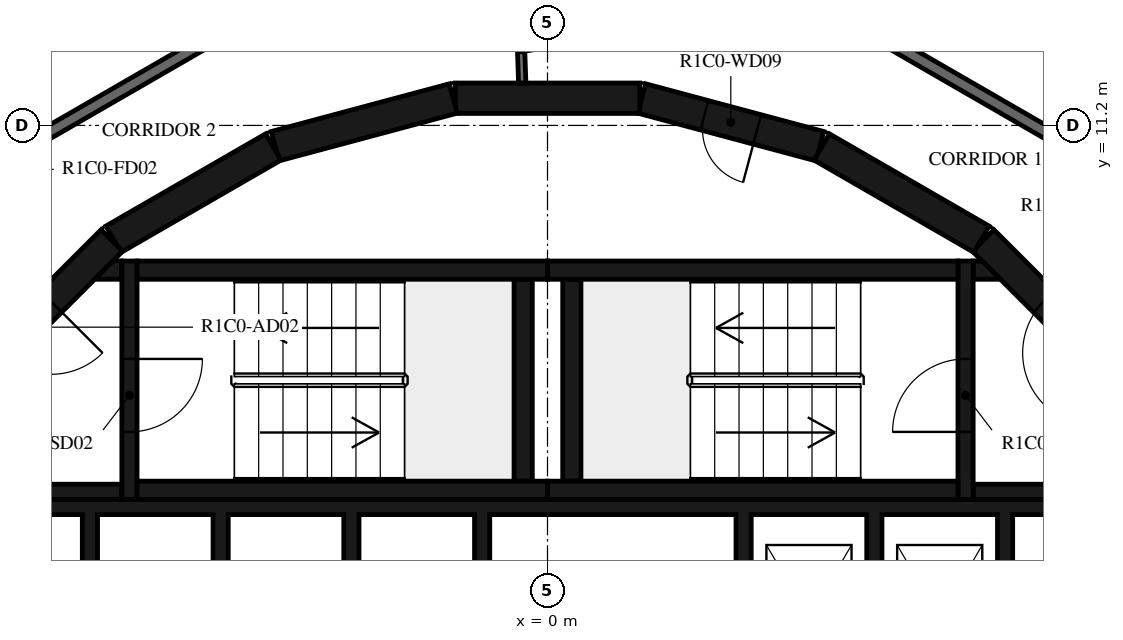
"""IFC4 building model, lengths in metres.
Left out: names, types, materials, properties, quantities, classifications, styles, units other than length and angle.
Written with IfcOpenShell. Run it as: python <this file> out.ifc"""

import sys

from ifc_helpers import new_model, si_unit, direction, frame, frame_2d, origin, place, context, subcontext, project, spatial, polyline, rectangle, outline, extrude, element, fill, save


model = new_model("IFC4")
c1 = context("Model", 3, precision=1e-05, world=origin(), true_north=direction((0.0, 1.0)))
c2 = subcontext(c1, "Body", "Model", "MODEL_VIEW")
j1 = project(units=[si_unit("LENGTHUNIT", "METRE"), si_unit("PLANEANGLEUNIT", "RADIAN")], contexts=[c1])
p1 = place(None, origin())
s1 = spatial("IfcSite", under=j1, at=p1, CompositionType="ELEMENT")
p2 = place(p1, origin())
s2 = spatial("IfcBuilding", under=s1, at=p2, CompositionType="ELEMENT")
p3 = place(p2, frame((0.0, 0.0, 59.4)))
s3 = spatial("IfcBuildingStorey", under=s2, at=p3, CompositionType="ELEMENT", Elevation=59.4)
p4 = place(p3, frame((9.308, 7.164, 0.0), z_axis=(0.0, 0.0, 1.0), x_axis=(-0.707106781187, 0.707106781187, 0.0)))
e1 = element("IfcWall", 1, at=p4, inside=s3, PredefinedType="SHEAR", context=c2, shape_type="SweptSolid", body=[
    extrude(rectangle(XDim=3.032, YDim=0.5, at=frame_2d((1.516, 0.0))), origin(), (0.0, 0.0, 1.0), 3.12),
])
p5 = place(p4, frame((0.416, 0.0, 0.0)))
e2 = element("IfcOpeningElement", 2, at=p5, cuts=e1, PredefinedType="OPENING", context=c2, shape_type="SweptSolid", body=[
    extrude(rectangle(XDim=1.2, YDim=2.1, at=frame_2d((0.6, 1.05))), frame((0.0, 0.26, 0.0), z_axis=(0.0, -1.0, 0.0), x_axis=(1.0, 0.0, 0.0)), (0.0, 0.0, 1.0), 0.52),
])
p6 = place(p3, frame((7.137, 9.329, 0.0), z_axis=(0.0, 0.0, 1.0), x_axis=(-0.865975092491, 0.500087131594, 0.0)))
e3 = element("IfcWall", 3, at=p6, inside=s3, PredefinedType="SHEAR", context=c2, shape_type="SweptSolid", body=[
    extrude(rectangle(XDim=3.033, YDim=0.5, at=frame_2d((1.516, 0.0))), origin(), (0.0, 0.0, 1.0), 3.12),
])
p7 = place(p3, frame((4.479, 10.858, 0.0), z_axis=(0.0, 0.0, 1.0), x_axis=(-0.965948410781, 0.258734743916, 0.0)))
e4 = element("IfcWall", 4, at=p7, inside=s3, PredefinedType="SHEAR", context=c2, shape_type="SweptSolid", body=[
    extrude(rectangle(XDim=3.033, YDim=0.5, at=frame_2d((1.516, 0.0))), origin(), (0.0, 0.0, 1.0), 3.12),
])
p8 = place(p7, frame((1.066, 0.0, 0.0)))
e5 = element("IfcOpeningElement", 5, at=p8, cuts=e4, PredefinedType="OPENING", context=c2, shape_type="SweptSolid", body=[
    extrude(rectangle(XDim=0.9, YDim=2.1, at=frame_2d((0.45, 1.05))), frame((0.0, 0.26, 0.0), z_axis=(0.0, -1.0, 0.0), x_axis=(1.0, 0.0, 0.0)), (0.0, 0.0, 1.0), 0.52),
])
for number, where, z_axis, x_axis in (
    (6, (1.516, 11.647, 0.0), (0.0, 0.0, 1.0), (-1.0, 0.0, 0.0)),
    (7, (-1.55, 11.643, 0.0), (0.0, 0.0, 1.0), (-0.966, -0.259, 0.0)),
    (8, (-4.51, 10.845, 0.0), (0.0, 0.0, 1.0), (-0.866, -0.5, 0.0)),
):
    element("IfcWall", number, at=place(p3, frame(where, z_axis=z_axis, x_axis=x_axis)), inside=s3, PredefinedType="SHEAR", context=c2, shape_type="SweptSolid", body=[
        extrude(rectangle(XDim=3.033, YDim=0.5, at=frame_2d((1.516, 0.0))), origin(), (0.0, 0.0, 1.0), 3.12),
    ])
p9 = place(p3, frame((-7.164, 9.308, 0.0), z_axis=(0.0, 0.0, 1.0), x_axis=(-0.707106781187, -0.707106781187, 0.0)))
e9 = element("IfcWall", 9, at=p9, inside=s3, PredefinedType="SHEAR", context=c2, shape_type="SweptSolid", body=[
    extrude(rectangle(XDim=3.032, YDim=0.5, at=frame_2d((1.516, 0.0))), origin(), (0.0, 0.0, 1.0), 3.12),
])
p10 = place(p9, frame((1.416, 0.0, 0.0)))
e10 = element("IfcOpeningElement", 10, at=p10, cuts=e9, PredefinedType="OPENING", context=c2, shape_type="SweptSolid", body=[
    extrude(rectangle(XDim=1.2, YDim=2.1, at=frame_2d((0.6, 1.05))), frame((0.0, 0.26, 0.0), z_axis=(0.0, -1.0, 0.0), x_axis=(1.0, 0.0, 0.0)), (0.0, 0.0, 1.0), 0.52),
])
for number, where, z_axis, x_axis in (
    (11, (0.0, 5.2, 0.0), (0.0, 0.0, 1.0), (1.0, 0.0, 0.0)),
    (12, (0.0, 8.82, 0.0), (0.0, 0.0, 1.0), (1.0, 0.0, 0.0)),
):
    element("IfcWall", number, at=place(p3, frame(where, z_axis=z_axis, x_axis=x_axis)), inside=s3, PredefinedType="SHEAR", context=c2, shape_type="SweptSolid", body=[
        extrude(rectangle(XDim=6.75, YDim=0.3, at=frame_2d((3.375, 0.0))), origin(), (0.0, 0.0, 1.0), 3.12),
    ])
p11 = place(p3, frame((0.4, 5.35, 0.0), z_axis=(0.0, 0.0, 1.0), x_axis=(0.0, 1.0, 0.0)))
e13 = element("IfcWall", 13, at=p11, inside=s3, PredefinedType="SHEAR", context=c2, shape_type="SweptSolid", body=[
    extrude(rectangle(XDim=3.32, YDim=0.3, at=frame_2d((1.66, 0.0))), origin(), (0.0, 0.0, 1.0), 3.12),
])
p12 = place(p3, frame((6.875, 5.05, 0.0), z_axis=(0.0, 0.0, 1.0), x_axis=(0.0, 1.0, 0.0)))
e14 = element("IfcWall", 14, at=p12, inside=s3, PredefinedType="SHEAR", context=c2, shape_type="SweptSolid", body=[
    extrude(rectangle(XDim=3.92, YDim=0.25, at=frame_2d((1.96, 0.0))), origin(), (0.0, 0.0, 1.0), 3.12),
])
p13 = place(p12, frame((1.11, 0.0, 0.0)))
e15 = element("IfcOpeningElement", 15, at=p13, cuts=e14, PredefinedType="OPENING", context=c2, shape_type="SweptSolid", body=[
    extrude(rectangle(XDim=1.2, YDim=2.1, at=frame_2d((0.6, 1.05))), frame((0.0, 0.135, 0.0), z_axis=(0.0, -1.0, 0.0), x_axis=(1.0, 0.0, 0.0)), (0.0, 0.0, 1.0), 0.27),
])
p14 = place(p3, frame((7.0, 5.175, 0.0), z_axis=(0.0, 0.0, 1.0), x_axis=(1.0, 0.0, 0.0)))
e16 = element("IfcWall", 16, at=p14, inside=s3, PredefinedType="SHEAR", context=c2, shape_type="SweptSolid", body=[
    extrude(rectangle(XDim=3.1, YDim=0.25, at=frame_2d((1.55, 0.0))), origin(), (0.0, 0.0, 1.0), 3.12),
])
p15 = place(p3, origin())
e17 = element("IfcWall", 17, at=p15, inside=s3, PredefinedType="SHEAR", context=c2, shape_type="SweptSolid", body=[
    extrude(outline(polyline([(7.448, 8.67), (7.0, 8.67), (7.0, 8.97), (7.148, 8.97), (7.448, 8.67)])), origin(), (0.0, 0.0, 1.0), 3.12),
])
for number, where, z_axis, x_axis in (
    (18, (-6.75, 5.2, 0.0), (0.0, 0.0, 1.0), (1.0, 0.0, 0.0)),
    (19, (-6.75, 8.82, 0.0), (0.0, 0.0, 1.0), (1.0, 0.0, 0.0)),
):
    element("IfcWall", number, at=place(p3, frame(where, z_axis=z_axis, x_axis=x_axis)), inside=s3, PredefinedType="SHEAR", context=c2, shape_type="SweptSolid", body=[
        extrude(rectangle(XDim=6.75, YDim=0.3, at=frame_2d((3.375, 0.0))), origin(), (0.0, 0.0, 1.0), 3.12),
    ])
p16 = place(p3, frame((-0.4, 5.35, 0.0), z_axis=(0.0, 0.0, 1.0), x_axis=(0.0, 1.0, 0.0)))
e20 = element("IfcWall", 20, at=p16, inside=s3, PredefinedType="SHEAR", context=c2, shape_type="SweptSolid", body=[
    extrude(rectangle(XDim=3.32, YDim=0.3, at=frame_2d((1.66, 0.0))), origin(), (0.0, 0.0, 1.0), 3.12),
])
p17 = place(p3, frame((-6.875, 8.97, 0.0), z_axis=(0.0, 0.0, 1.0), x_axis=(0.0, -1.0, 0.0)))
e21 = element("IfcWall", 21, at=p17, inside=s3, PredefinedType="SHEAR", context=c2, shape_type="SweptSolid", body=[
    extrude(rectangle(XDim=3.92, YDim=0.25, at=frame_2d((1.96, 0.0))), origin(), (0.0, 0.0, 1.0), 3.12),
])
p18 = place(p17, frame((1.61, 0.0, 0.0)))
e22 = element("IfcOpeningElement", 22, at=p18, cuts=e21, PredefinedType="OPENING", context=c2, shape_type="SweptSolid", body=[
    extrude(rectangle(XDim=1.2, YDim=2.1, at=frame_2d((0.6, 1.05))), frame((0.0, 0.135, 0.0), z_axis=(0.0, -1.0, 0.0), x_axis=(1.0, 0.0, 0.0)), (0.0, 0.0, 1.0), 0.27),
])
p19 = place(p3, frame((-7.0, 5.175, 0.0), z_axis=(0.0, 0.0, 1.0), x_axis=(-1.0, 0.0, 0.0)))
e23 = element("IfcWall", 23, at=p19, inside=s3, PredefinedType="SHEAR", context=c2, shape_type="SweptSolid", body=[
    extrude(rectangle(XDim=3.1, YDim=0.25, at=frame_2d((1.55, 0.0))), origin(), (0.0, 0.0, 1.0), 3.12),
])
p20 = place(p3, origin())
e24 = element("IfcWall", 24, at=p20, inside=s3, PredefinedType="SHEAR", context=c2, shape_type="SweptSolid", body=[
    extrude(outline(polyline([(-7.148, 8.97), (-7.0, 8.97), (-7.0, 8.67), (-7.448, 8.67), (-7.148, 8.97)])), origin(), (0.0, 0.0, 1.0), 3.12),
])
p21 = place(p3, origin())
e25 = element("IfcWall", 25, at=p21, inside=s3, PredefinedType="SHEAR", context=c2, shape_type="SweptSolid", body=[
    extrude(outline(polyline([(-9.55, 4.8), (-7.65, 4.8), (-7.65, 1.9), (-7.4, 1.9), (-7.4, 4.8), (-5.5, 4.8), (-5.5, 1.9), (-5.25, 1.9), (-5.25, 4.8), (-3.35, 4.8), (-3.35, 1.9), (-3.1, 1.9), (-3.1, 4.8), (-1.2, 4.8), (-1.2, 1.9), (-0.95, 1.9), (-0.95, 4.8), (3.1, 4.8), (3.1, 1.9), (3.35, 1.9), (3.35, 4.8), (5.25, 4.8), (5.25, 1.9), (5.5, 1.9), (5.5, 4.8), (7.4, 4.8), (7.4, 1.9), (7.65, 1.9), (7.65, 4.8), (9.55, 4.8), (9.55, 1.9), (9.8, 1.9), (9.8, 4.8), (9.8, 5.05), (-9.8, 5.05), (-9.8, 4.8), (-9.8, 1.9), (-9.55, 1.9), (-9.55, 4.8)])), origin(), (0.0, 0.0, 1.0), 3.12),
])
p22 = place(p3, frame((-0.479, 13.7, 0.0), z_axis=(0.0, 0.0, 1.0), x_axis=(0.034919103017, -0.999390142159, 0.0)))
e26 = element("IfcWall", 26, at=p22, inside=s3, PredefinedType="PARTITIONING", context=c2, shape_type="SweptSolid", body=[
    extrude(rectangle(XDim=1.804, YDim=0.12, at=frame_2d((0.902, 0.0))), origin(), (0.0, 0.0, 1.0), 3.12),
])
p23 = place(p22, frame((0.11, 0.0, 0.0)))
e27 = element("IfcOpeningElement", 27, at=p23, cuts=e26, PredefinedType="OPENING", context=c2, shape_type="SweptSolid", body=[
    extrude(rectangle(XDim=1.2, YDim=2.1, at=frame_2d((0.6, 1.05))), frame((0.0, 0.07, 0.0), z_axis=(0.0, -1.0, 0.0), x_axis=(1.0, 0.0, 0.0)), (0.0, 0.0, 1.0), 0.14),
])
p24 = place(p3, frame((10.029, 10.029, 0.0), z_axis=(0.0, 0.0, 1.0), x_axis=(-0.866024439905, 0.500001669485, 0.0)))
e28 = element("IfcWall", 28, at=p24, inside=s3, PredefinedType="STANDARD", context=c2, shape_type="SweptSolid", body=[
    extrude(rectangle(XDim=7.342, YDim=0.2, at=frame_2d((3.671, 0.0))), origin(), (0.0, 0.0, 1.0), 3.12),
])
p25 = place(p3, frame((-3.671, 13.7, 0.0), z_axis=(0.0, 0.0, 1.0), x_axis=(-0.866031419417, -0.499989580474, 0.0)))
e29 = element("IfcWall", 29, at=p25, inside=s3, PredefinedType="STANDARD", context=c2, shape_type="SweptSolid", body=[
    extrude(rectangle(XDim=7.147, YDim=0.2, at=frame_2d((3.573, 0.0))), origin(), (0.0, 0.0, 1.0), 3.12),
])
p26 = place(p25, frame((5.947, 0.0, 0.0)))
e30 = element("IfcOpeningElement", 30, at=p26, cuts=e29, PredefinedType="OPENING", context=c2, shape_type="SweptSolid", body=[
    extrude(rectangle(XDim=1.0, YDim=2.1, at=frame_2d((0.5, 1.05))), frame((0.0, 0.11, 0.0), z_axis=(0.0, -1.0, 0.0), x_axis=(1.0, 0.0, 0.0)), (0.0, 0.0, 1.0), 0.22),
])
p27 = place(p3, frame((11.127, 11.127, 0.0), z_axis=(0.0, 0.0, 1.0), x_axis=(-0.86602299963, 0.500004164094, 0.0)))
e31 = element("IfcWall", 31, at=p27, inside=s3, PredefinedType="PARTITIONING", context=c2, shape_type="SweptSolid", body=[
    extrude(rectangle(XDim=7.052, YDim=0.12, at=frame_2d((3.526, 0.0))), origin(), (0.0, 0.0, 1.0), 3.12),
])
p28 = place(p27, frame((1.4, 0.0, 0.0)))
e32 = element("IfcOpeningElement", 32, at=p28, cuts=e31, PredefinedType="OPENING", context=c2, shape_type="SweptSolid", body=[
    extrude(rectangle(XDim=0.8, YDim=2.1, at=frame_2d((0.4, 1.05))), frame((0.0, 0.07, 0.0), z_axis=(0.0, -1.0, 0.0), x_axis=(1.0, 0.0, 0.0)), (0.0, 0.0, 1.0), 0.14),
])
p29 = place(p13, origin())
e33 = element("IfcDoor", 33, at=p29, inside=s3, OperationType="SINGLE_SWING_LEFT", PredefinedType="DOOR", context=c2, shape_type="SweptSolid", body=[
    extrude(rectangle(XDim=1.2, YDim=2.1, at=frame_2d((0.6, 1.05))), frame((0.0, 0.025, 0.0), z_axis=(0.0, -1.0, 0.0), x_axis=(1.0, 0.0, 0.0)), (0.0, 0.0, 1.0), 0.05),
])
fill(e15, e33)
p30 = place(p5, origin())
e34 = element("IfcDoor", 34, at=p30, inside=s3, OperationType="SINGLE_SWING_RIGHT", PredefinedType="DOOR", context=c2, shape_type="SweptSolid", body=[
    extrude(rectangle(XDim=1.2, YDim=2.1, at=frame_2d((0.6, 1.05))), frame((0.0, 0.025, 0.0), z_axis=(0.0, -1.0, 0.0), x_axis=(1.0, 0.0, 0.0)), (0.0, 0.0, 1.0), 0.05),
])
fill(e2, e34)
p31 = place(p18, origin())
e35 = element("IfcDoor", 35, at=p31, inside=s3, OperationType="SINGLE_SWING_LEFT", PredefinedType="DOOR", context=c2, shape_type="SweptSolid", body=[
    extrude(rectangle(XDim=1.2, YDim=2.1, at=frame_2d((0.6, 1.05))), frame((0.0, 0.025, 0.0), z_axis=(0.0, -1.0, 0.0), x_axis=(1.0, 0.0, 0.0)), (0.0, 0.0, 1.0), 0.05),
])
fill(e22, e35)
p32 = place(p10, origin())
e36 = element("IfcDoor", 36, at=p32, inside=s3, OperationType="SINGLE_SWING_RIGHT", PredefinedType="DOOR", context=c2, shape_type="SweptSolid", body=[
    extrude(rectangle(XDim=1.2, YDim=2.1, at=frame_2d((0.6, 1.05))), frame((0.0, 0.025, 0.0), z_axis=(0.0, -1.0, 0.0), x_axis=(1.0, 0.0, 0.0)), (0.0, 0.0, 1.0), 0.05),
])
fill(e10, e36)
p33 = place(p8, origin())
e37 = element("IfcDoor", 37, at=p33, inside=s3, OperationType="SINGLE_SWING_RIGHT", PredefinedType="DOOR", context=c2, shape_type="SweptSolid", body=[
    extrude(rectangle(XDim=0.9, YDim=2.1, at=frame_2d((0.45, 1.05))), frame((0.0, 0.025, 0.0), z_axis=(0.0, -1.0, 0.0), x_axis=(1.0, 0.0, 0.0)), (0.0, 0.0, 1.0), 0.05),
])
fill(e5, e37)
p34 = place(p23, origin())
e38 = element("IfcDoor", 38, at=p34, inside=s3, OperationType="DOUBLE_DOOR_SINGLE_SWING", PredefinedType="DOOR", context=c2, shape_type="SweptSolid", body=[
    extrude(rectangle(XDim=1.2, YDim=2.1, at=frame_2d((0.6, 1.05))), frame((0.0, 0.025, 0.0), z_axis=(0.0, -1.0, 0.0), x_axis=(1.0, 0.0, 0.0)), (0.0, 0.0, 1.0), 0.05),
])
fill(e27, e38)
save(model, sys.argv[1])
